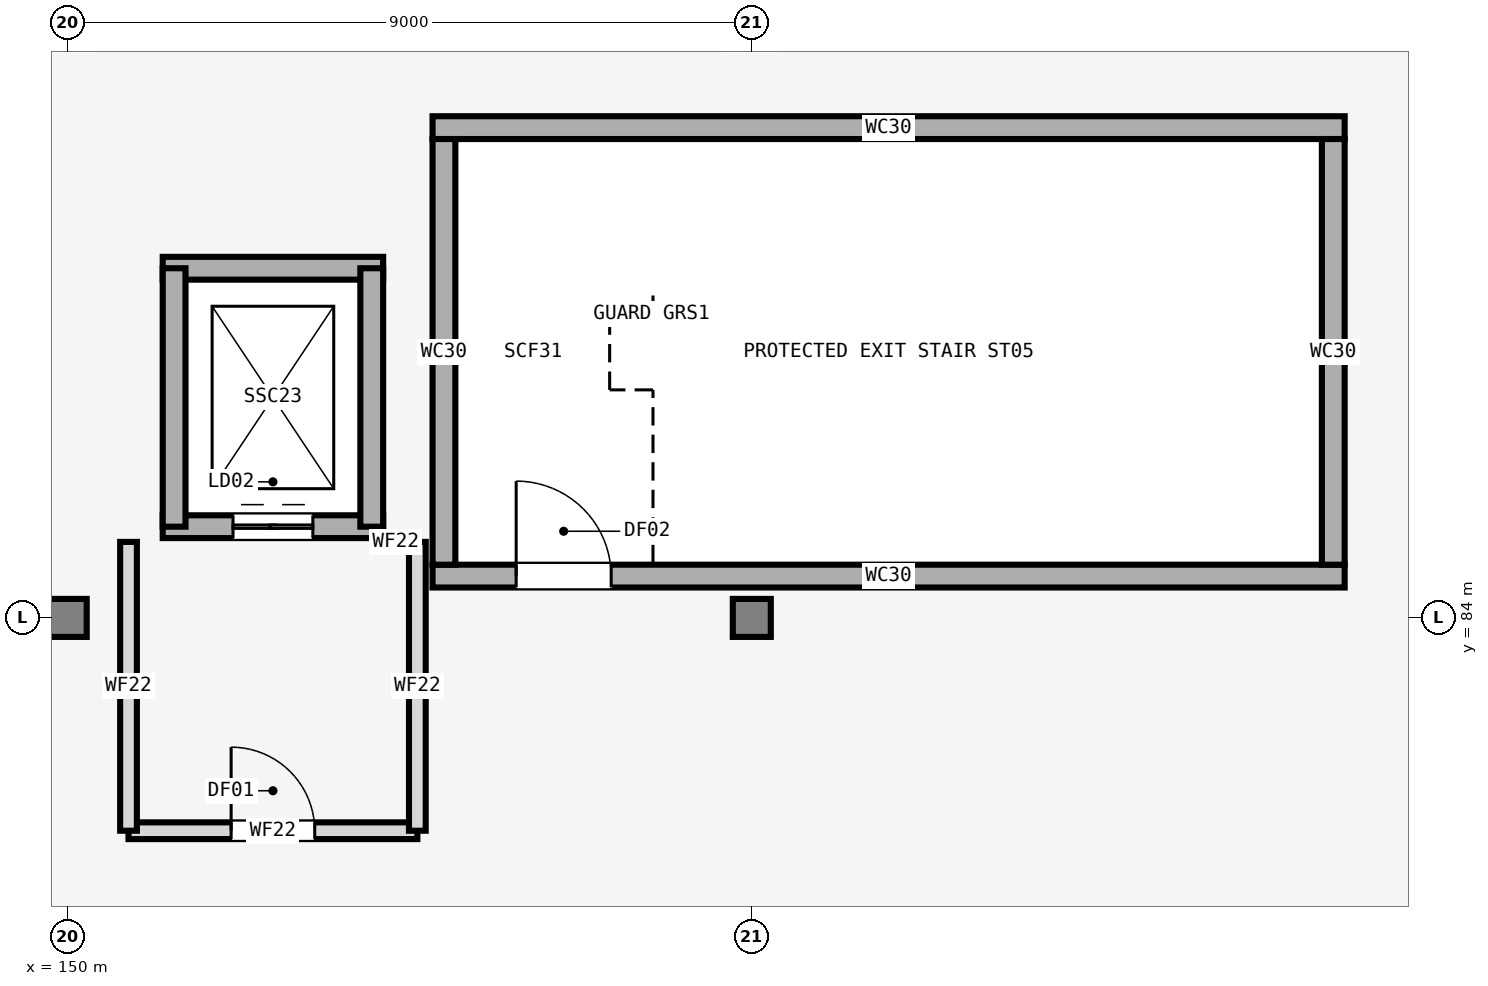
"""IFC4 building model, lengths in metres.
Left out: names, types, materials, properties, quantities, classifications, styles, units other than length and angle.
Written with IfcOpenShell. Run it as: python <this file> out.ifc"""

import sys

from ifc_helpers import new_model, si_unit, direction, frame, frame_2d, origin, origin_2d, place, context, subcontext, project, spatial, rectangle, extrude, element, fill, save


model = new_model("IFC4")
c1 = context("Model", 3, precision=1e-05, world=origin(), true_north=direction((0.0, 1.0)))
c2 = subcontext(c1, "Body", "Model", "MODEL_VIEW")
j1 = project(units=[si_unit("LENGTHUNIT", "METRE"), si_unit("PLANEANGLEUNIT", "RADIAN")], contexts=[c1])
p1 = place(None, origin())
s1 = spatial("IfcSite", under=j1, at=p1, CompositionType="ELEMENT")
p2 = place(p1, origin())
s2 = spatial("IfcBuilding", under=s1, at=p2, CompositionType="ELEMENT")
p3 = place(p2, frame((0.0, 0.0, 9.3)))
s3 = spatial("IfcBuildingStorey", under=s2, at=p3, CompositionType="ELEMENT", Elevation=9.3)
for number, where, z_axis, x_axis in (
    (1, (150.0, 84.0, 0.0), (0.0, 0.0, 1.0), (1.0, 0.0, 0.0)),
    (2, (159.0, 84.0, 0.0), (0.0, 0.0, 1.0), (1.0, 0.0, 0.0)),
):
    element("IfcColumn", number, at=place(p3, frame(where, z_axis=z_axis, x_axis=x_axis)), inside=s3, PredefinedType="COLUMN", context=c2, shape_type="SweptSolid", body=[
        extrude(rectangle(XDim=0.5, YDim=0.5, at=origin_2d()), origin(), (0.0, 0.0, 1.0), 4.2),
    ])
p4 = place(p3, frame((154.8, 84.55, 0.0), z_axis=(0.0, 0.0, 1.0), x_axis=(1.0, 0.0, 0.0)))
e3 = element("IfcWall", 3, at=p4, inside=s3, PredefinedType="SHEAR", context=c2, shape_type="SweptSolid", body=[
    extrude(rectangle(XDim=12.0, YDim=0.3, at=frame_2d((6.0, 0.0))), origin(), (0.0, 0.0, 1.0), 4.2),
])
p5 = place(p4, frame((1.1, 0.0, 0.0)))
e4 = element("IfcOpeningElement", 4, at=p5, cuts=e3, PredefinedType="OPENING", context=c2, shape_type="SweptSolid", body=[
    extrude(rectangle(XDim=1.25, YDim=2.15, at=frame_2d((0.625, 1.075))), frame((0.0, 0.16, 0.0), z_axis=(0.0, -1.0, 0.0), x_axis=(1.0, 0.0, 0.0)), (0.0, 0.0, 1.0), 0.32),
])
p6 = place(p3, frame((166.8, 90.45, 0.0), z_axis=(0.0, 0.0, 1.0), x_axis=(-1.0, 0.0, 0.0)))
e5 = element("IfcWall", 5, at=p6, inside=s3, PredefinedType="SHEAR", context=c2, shape_type="SweptSolid", body=[
    extrude(rectangle(XDim=12.0, YDim=0.3, at=frame_2d((6.0, 0.0))), origin(), (0.0, 0.0, 1.0), 4.2),
])
for number, where, z_axis, x_axis in (
    (6, (154.95, 90.3, 0.0), (0.0, 0.0, 1.0), (0.0, -1.0, 0.0)),
    (7, (166.65, 84.7, 0.0), (0.0, 0.0, 1.0), (0.0, 1.0, 0.0)),
):
    element("IfcWall", number, at=place(p3, frame(where, z_axis=z_axis, x_axis=x_axis)), inside=s3, PredefinedType="SHEAR", context=c2, shape_type="SweptSolid", body=[
        extrude(rectangle(XDim=5.6, YDim=0.3, at=frame_2d((2.8, 0.0))), origin(), (0.0, 0.0, 1.0), 4.2),
    ])
p7 = place(p3, frame((151.25, 85.2, 0.0), z_axis=(0.0, 0.0, 1.0), x_axis=(1.0, 0.0, 0.0)))
e8 = element("IfcWall", 8, at=p7, inside=s3, PredefinedType="SHEAR", context=c2, shape_type="SweptSolid", body=[
    extrude(rectangle(XDim=2.9, YDim=0.3, at=frame_2d((1.45, 0.0))), origin(), (0.0, 0.0, 1.0), 4.2),
])
p8 = place(p7, frame((0.925, 0.0, 0.0)))
e9 = element("IfcOpeningElement", 9, at=p8, cuts=e8, PredefinedType="OPENING", context=c2, shape_type="SweptSolid", body=[
    extrude(rectangle(XDim=1.05, YDim=2.15, at=frame_2d((0.525, 1.075))), frame((0.0, 0.16, 0.0), z_axis=(0.0, -1.0, 0.0), x_axis=(1.0, 0.0, 0.0)), (0.0, 0.0, 1.0), 0.32),
])
p9 = place(p3, frame((154.15, 88.6, 0.0), z_axis=(0.0, 0.0, 1.0), x_axis=(-1.0, 0.0, 0.0)))
e10 = element("IfcWall", 10, at=p9, inside=s3, PredefinedType="SHEAR", context=c2, shape_type="SweptSolid", body=[
    extrude(rectangle(XDim=2.9, YDim=0.3, at=frame_2d((1.45, 0.0))), origin(), (0.0, 0.0, 1.0), 4.2),
])
for number, where, z_axis, x_axis in (
    (11, (151.4, 88.6, 0.0), (0.0, 0.0, 1.0), (0.0, -1.0, 0.0)),
    (12, (154.0, 85.2, 0.0), (0.0, 0.0, 1.0), (0.0, 1.0, 0.0)),
):
    element("IfcWall", number, at=place(p3, frame(where, z_axis=z_axis, x_axis=x_axis)), inside=s3, PredefinedType="SHEAR", context=c2, shape_type="SweptSolid", body=[
        extrude(rectangle(XDim=3.4, YDim=0.3, at=frame_2d((1.7, 0.0))), origin(), (0.0, 0.0, 1.0), 4.2),
    ])
p10 = place(p3, frame((150.8, 81.2, 0.0), z_axis=(0.0, 0.0, 1.0), x_axis=(1.0, 0.0, 0.0)))
e13 = element("IfcWall", 13, at=p10, inside=s3, PredefinedType="SOLIDWALL", context=c2, shape_type="SweptSolid", body=[
    extrude(rectangle(XDim=3.8, YDim=0.22, at=frame_2d((1.9, 0.0))), origin(), (0.0, 0.0, 1.0), 3.12),
])
p11 = place(p10, frame((1.35, 0.0, 0.0)))
e14 = element("IfcOpeningElement", 14, at=p11, cuts=e13, PredefinedType="OPENING", context=c2, shape_type="SweptSolid", body=[
    extrude(rectangle(XDim=1.1, YDim=2.15, at=frame_2d((0.55, 1.075))), frame((0.0, 0.12, 0.0), z_axis=(0.0, -1.0, 0.0), x_axis=(1.0, 0.0, 0.0)), (0.0, 0.0, 1.0), 0.24),
])
for number, where, z_axis, x_axis in (
    (15, (150.8, 81.2, 0.0), (0.0, 0.0, 1.0), (0.0, 1.0, 0.0)),
    (16, (154.6, 81.2, 0.0), (0.0, 0.0, 1.0), (0.0, 1.0, 0.0)),
):
    element("IfcWall", number, at=place(p3, frame(where, z_axis=z_axis, x_axis=x_axis)), inside=s3, PredefinedType="SOLIDWALL", context=c2, shape_type="SweptSolid", body=[
        extrude(rectangle(XDim=3.8, YDim=0.22, at=frame_2d((1.9, 0.0))), origin(), (0.0, 0.0, 1.0), 3.12),
    ])
p12 = place(p3, frame((154.15, 85.0, 0.0), z_axis=(0.0, 0.0, 1.0), x_axis=(1.0, 0.0, 0.0)))
e17 = element("IfcWall", 17, at=p12, inside=s3, PredefinedType="SOLIDWALL", context=c2, shape_type="SweptSolid", body=[
    extrude(rectangle(XDim=0.33, YDim=0.22, at=frame_2d((0.165, 0.0))), origin(), (0.0, 0.0, 1.0), 3.12),
])
p13 = place(p5, origin())
e18 = element("IfcDoor", 18, at=p13, inside=s3, OperationType="SINGLE_SWING_LEFT", PredefinedType="DOOR", context=c2, shape_type="SweptSolid", body=[
    extrude(rectangle(XDim=1.25, YDim=2.15, at=frame_2d((0.625, 1.075))), frame((0.0, 0.025, 0.0), z_axis=(0.0, -1.0, 0.0), x_axis=(1.0, 0.0, 0.0)), (0.0, 0.0, 1.0), 0.05),
])
fill(e4, e18)
p14 = place(p8, origin())
e19 = element("IfcDoor", 19, at=p14, inside=s3, OperationType="DOUBLE_DOOR_SLIDING", PredefinedType="DOOR", context=c2, shape_type="SweptSolid", body=[
    extrude(rectangle(XDim=1.05, YDim=2.15, at=frame_2d((0.525, 1.075))), frame((0.0, 0.025, 0.0), z_axis=(0.0, -1.0, 0.0), x_axis=(1.0, 0.0, 0.0)), (0.0, 0.0, 1.0), 0.05),
])
fill(e9, e19)
p15 = place(p11, origin())
e20 = element("IfcDoor", 20, at=p15, inside=s3, OperationType="SINGLE_SWING_LEFT", PredefinedType="DOOR", context=c2, shape_type="SweptSolid", body=[
    extrude(rectangle(XDim=1.1, YDim=2.15, at=frame_2d((0.55, 1.075))), frame((0.0, 0.025, 0.0), z_axis=(0.0, -1.0, 0.0), x_axis=(1.0, 0.0, 0.0)), (0.0, 0.0, 1.0), 0.05),
])
fill(e14, e20)
save(model, sys.argv[1])
